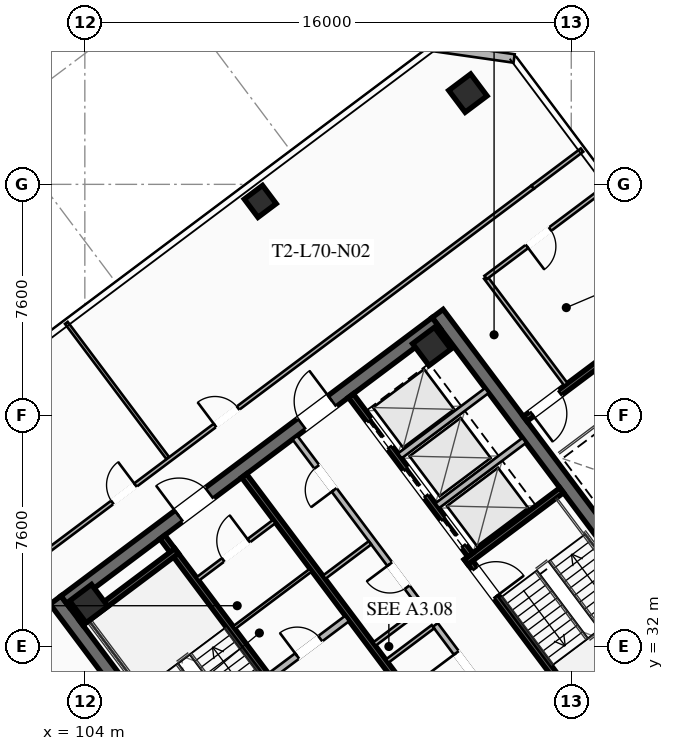
"""IFC4 building model, lengths in metres.
Left out: names, types, materials, properties, quantities, classifications, styles, units other than length and angle.
Written with IfcOpenShell. Run it as: python <this file> out.ifc"""

import sys

from ifc_helpers import new_model, si_unit, direction, frame, frame_2d, origin, origin_2d, place, context, subcontext, project, spatial, rectangle, hollow_rectangle, extrude, element, fill, save


model = new_model("IFC4")
c1 = context("Model", 3, precision=1e-05, world=origin(), true_north=direction((0.0, 1.0)))
c2 = subcontext(c1, "Body", "Model", "MODEL_VIEW")
j1 = project(units=[si_unit("LENGTHUNIT", "METRE"), si_unit("PLANEANGLEUNIT", "RADIAN")], contexts=[c1])
p1 = place(None, origin())
s1 = spatial("IfcSite", under=j1, at=p1, CompositionType="ELEMENT")
p2 = place(p1, origin())
s2 = spatial("IfcBuilding", under=s1, at=p2, CompositionType="ELEMENT")
p3 = place(p2, frame((0.0, 0.0, 259.4)))
s3 = spatial("IfcBuildingStorey", under=s2, at=p3, CompositionType="ELEMENT", Elevation=259.4)
for number, where, z_axis, x_axis in (
    (1, (112.396, 21.047, 0.0), (0.0, 0.0, 1.0), (-0.6, 0.8, 0.0)),
    (2, (115.604, 42.953, 0.0), (0.0, 0.0, 1.0), (0.6, -0.8, 0.0)),
):
    element("IfcWall", number, at=place(p3, frame(where, z_axis=z_axis, x_axis=x_axis)), inside=s3, PredefinedType="SHEAR", context=c2, shape_type="SweptSolid", body=[
        extrude(rectangle(XDim=15.6, YDim=0.45, at=frame_2d((7.8, 0.0))), origin(), (0.0, 0.0, 1.0), 4.0),
    ])
p4 = place(p3, frame((103.351, 33.482, 0.0), z_axis=(0.0, 0.0, 1.0), x_axis=(0.8, 0.6, 0.0)))
e3 = element("IfcWall", 3, at=p4, inside=s3, PredefinedType="SHEAR", context=c2, shape_type="SweptSolid", body=[
    extrude(rectangle(XDim=15.26, YDim=0.45, at=frame_2d((7.63, 0.0))), origin(), (0.0, 0.0, 1.0), 4.0),
])
p5 = place(p4, frame((4.68, 0.0, 0.0)))
e4 = element("IfcOpeningElement", 4, at=p5, cuts=e3, PredefinedType="OPENING", context=c2, shape_type="SweptSolid", body=[
    extrude(rectangle(XDim=1.25, YDim=2.25, at=frame_2d((0.625, 1.125))), frame((0.0, 0.235, 0.0), z_axis=(0.0, -1.0, 0.0), x_axis=(1.0, 0.0, 0.0)), (0.0, 0.0, 1.0), 0.47),
])
p6 = place(p4, frame((9.73, 0.0, 0.0)))
e5 = element("IfcOpeningElement", 5, at=p6, cuts=e3, PredefinedType="OPENING", context=c2, shape_type="SweptSolid", body=[
    extrude(rectangle(XDim=1.25, YDim=2.25, at=frame_2d((0.625, 1.125))), frame((0.0, 0.235, 0.0), z_axis=(0.0, -1.0, 0.0), x_axis=(1.0, 0.0, 0.0)), (0.0, 0.0, 1.0), 0.47),
])
for number, where, z_axis, x_axis in (
    (6, (115.41, 41.87, 0.0), (0.0, 0.0, 1.0), (0.8, 0.6, 0.0)),
    (7, (104.13, 33.41, 0.0), (0.0, 0.0, 1.0), (0.8, 0.6, 0.0)),
    (8, (116.6, 50.2, 0.0), (0.0, 0.0, 1.0), (0.8, 0.6, 0.0)),
):
    element("IfcColumn", number, at=place(p3, frame(where, z_axis=z_axis, x_axis=x_axis)), inside=s3, PredefinedType="COLUMN", context=c2, shape_type="SweptSolid", body=[
        extrude(hollow_rectangle(XDim=0.9, YDim=0.9, WallThickness=0.04, at=origin_2d()), origin(), (0.0, 0.0, 1.0), 3.7),
    ])
p7 = place(p3, frame((109.77, 46.64, 0.0), z_axis=(0.0, 0.0, 1.0), x_axis=(0.799999996291, 0.600000004945, 0.0)))
e9 = element("IfcColumn", 9, at=p7, inside=s3, PredefinedType="COLUMN", context=c2, shape_type="SweptSolid", body=[
    extrude(hollow_rectangle(XDim=0.75, YDim=0.75, WallThickness=0.032, at=origin_2d()), origin(), (0.0, 0.0, 1.0), 3.7),
])
p8 = place(p3, frame((115.46, 51.72, 0.0), z_axis=(0.0, 0.0, 1.0), x_axis=(0.989956760759, -0.141370477216, 0.0)))
e10 = element("IfcWall", 10, at=p8, inside=s3, PredefinedType="SOLIDWALL", context=c2, shape_type="SweptSolid", body=[
    extrude(rectangle(XDim=2.687, YDim=0.28, at=frame_2d((1.344, 0.0))), origin(), (0.0, 0.0, 1.0), 3.7),
])
p9 = place(p3, frame((111.44, 29.08, 0.0), z_axis=(0.0, 0.0, 1.0), x_axis=(-0.59999041401, 0.800007189403, 0.0)))
e11 = element("IfcWall", 11, at=p9, inside=s3, PredefinedType="SHEAR", context=c2, shape_type="SweptSolid", body=[
    extrude(rectangle(XDim=8.15, YDim=0.2, at=frame_2d((4.075, 0.0))), origin(), (0.0, 0.0, 1.0), 3.7),
])
p10 = place(p9, frame((0.45, 0.0, 0.0)))
e12 = element("IfcOpeningElement", 12, at=p10, cuts=e11, PredefinedType="OPENING", context=c2, shape_type="SweptSolid", body=[
    extrude(rectangle(XDim=1.15, YDim=2.2, at=frame_2d((0.575, 1.1))), frame((0.0, 0.11, 0.0), z_axis=(0.0, -1.0, 0.0), x_axis=(1.0, 0.0, 0.0)), (0.0, 0.0, 1.0), 0.22),
])
p11 = place(p3, frame((103.876, 32.782, 0.0), z_axis=(0.0, 0.0, 1.0), x_axis=(0.800014909178, 0.599980120581, 0.0)))
e13 = element("IfcWall", 13, at=p11, inside=s3, PredefinedType="SHEAR", context=c2, shape_type="SweptSolid", body=[
    extrude(rectangle(XDim=3.93, YDim=0.2, at=frame_2d((1.965, 0.0))), origin(), (0.0, 0.0, 1.0), 3.7),
])
p12 = place(p3, frame((116.56, 34.92, 0.0), z_axis=(0.0, 0.0, 1.0), x_axis=(0.59999041401, -0.800007189403, 0.0)))
e14 = element("IfcWall", 14, at=p12, inside=s3, PredefinedType="SHEAR", context=c2, shape_type="SweptSolid", body=[
    extrude(rectangle(XDim=8.15, YDim=0.2, at=frame_2d((4.075, 0.0))), origin(), (0.0, 0.0, 1.0), 3.7),
])
p13 = place(p12, frame((0.45, 0.0, 0.0)))
e15 = element("IfcOpeningElement", 15, at=p13, cuts=e14, PredefinedType="OPENING", context=c2, shape_type="SweptSolid", body=[
    extrude(rectangle(XDim=1.15, YDim=2.2, at=frame_2d((0.575, 1.1))), frame((0.0, 0.11, 0.0), z_axis=(0.0, -1.0, 0.0), x_axis=(1.0, 0.0, 0.0)), (0.0, 0.0, 1.0), 0.22),
])
p14 = place(p3, frame((116.54, 34.78, 0.0), z_axis=(0.0, 0.0, 1.0), x_axis=(0.800014909178, 0.599980120581, 0.0)))
e16 = element("IfcWall", 16, at=p14, inside=s3, PredefinedType="SHEAR", context=c2, shape_type="SweptSolid", body=[
    extrude(rectangle(XDim=3.93, YDim=0.2, at=frame_2d((1.965, 0.0))), origin(), (0.0, 0.0, 1.0), 3.7),
])
p15 = place(p3, frame((118.058, 25.856, 0.0), z_axis=(0.0, 0.0, 1.0), x_axis=(-0.600002657301, 0.799998007018, 0.0)))
e17 = element("IfcWall", 17, at=p15, inside=s3, PredefinedType="SHEAR", context=c2, shape_type="SweptSolid", body=[
    extrude(rectangle(XDim=14.7, YDim=0.2, at=frame_2d((7.35, 0.0))), origin(), (0.0, 0.0, 1.0), 3.7),
])
p16 = place(p3, frame((110.104, 31.028, 0.0), z_axis=(0.0, 0.0, 1.0), x_axis=(0.800018601094, 0.59997519774, 0.0)))
e18 = element("IfcWall", 18, at=p16, inside=s3, PredefinedType="SOLIDWALL", context=c2, shape_type="SweptSolid", body=[
    extrude(rectangle(XDim=3.15, YDim=0.22, at=frame_2d((1.575, 0.0))), origin(), (0.0, 0.0, 1.0), 2.659),
])
p17 = place(p16, frame((1.1, 0.0, 0.0)))
e19 = element("IfcOpeningElement", 19, at=p17, cuts=e18, PredefinedType="OPENING", context=c2, shape_type="SweptSolid", body=[
    extrude(rectangle(XDim=0.95, YDim=2.05, at=frame_2d((0.475, 1.025))), frame((0.0, 0.12, 0.0), z_axis=(0.0, -1.0, 0.0), x_axis=(1.0, 0.0, 0.0)), (0.0, 0.0, 1.0), 0.24),
])
p18 = place(p3, frame((112.75, 40.25, 0.0), z_axis=(0.0, 0.0, 1.0), x_axis=(0.599994036198, -0.800004472816, 0.0)))
e20 = element("IfcWall", 20, at=p18, inside=s3, PredefinedType="SHEAR", context=c2, shape_type="SweptSolid", body=[
    extrude(rectangle(XDim=6.55, YDim=0.2, at=frame_2d((3.275, 0.0))), origin(), (0.0, 0.0, 1.0), 3.7),
])
p19 = place(p18, frame((5.075, 0.0, 0.0)))
e21 = element("IfcOpeningElement", 21, at=p19, cuts=e20, PredefinedType="OPENING", context=c2, shape_type="SweptSolid", body=[
    extrude(rectangle(XDim=1.1, YDim=2.2, at=frame_2d((0.55, 1.1))), frame((0.0, 0.11, 0.0), z_axis=(0.0, -1.0, 0.0), x_axis=(1.0, 0.0, 0.0)), (0.0, 0.0, 1.0), 0.22),
])
p20 = place(p18, frame((3.025, 0.0, 0.0)))
e22 = element("IfcOpeningElement", 22, at=p20, cuts=e20, PredefinedType="OPENING", context=c2, shape_type="SweptSolid", body=[
    extrude(rectangle(XDim=1.1, YDim=2.2, at=frame_2d((0.55, 1.1))), frame((0.0, 0.11, 0.0), z_axis=(0.0, -1.0, 0.0), x_axis=(1.0, 0.0, 0.0)), (0.0, 0.0, 1.0), 0.22),
])
p21 = place(p18, frame((1.025, 0.0, 0.0)))
e23 = element("IfcOpeningElement", 23, at=p21, cuts=e20, PredefinedType="OPENING", context=c2, shape_type="SweptSolid", body=[
    extrude(rectangle(XDim=1.1, YDim=2.2, at=frame_2d((0.55, 1.1))), frame((0.0, 0.11, 0.0), z_axis=(0.0, -1.0, 0.0), x_axis=(1.0, 0.0, 0.0)), (0.0, 0.0, 1.0), 0.22),
])
for number, where, z_axis, x_axis in (
    (24, (115.59, 36.63, 0.0), (0.0, 0.0, 1.0), (0.8, 0.6, 0.0)),
    (25, (114.36, 38.27, 0.0), (0.0, 0.0, 1.0), (0.8, 0.6, 0.0)),
):
    element("IfcWall", number, at=place(p3, frame(where, z_axis=z_axis, x_axis=x_axis)), inside=s3, PredefinedType="SOLIDWALL", context=c2, shape_type="SweptSolid", body=[
        extrude(rectangle(XDim=3.58, YDim=0.2, at=frame_2d((1.79, 0.0))), origin(), (0.0, 0.0, 1.0), 3.7),
    ])
p22 = place(p3, frame((107.71, 34.22, 0.0), z_axis=(0.0, 0.0, 1.0), x_axis=(0.799981399002, 0.60002480053, 0.0)))
e26 = element("IfcWall", 26, at=p22, inside=s3, PredefinedType="PARTITIONING", context=c2, shape_type="SweptSolid", body=[
    extrude(rectangle(XDim=3.15, YDim=0.135, at=frame_2d((1.575, 0.0))), origin(), (0.0, 0.0, 1.0), 2.659),
])
p23 = place(p22, frame((1.05, 0.0, 0.0)))
e27 = element("IfcOpeningElement", 27, at=p23, cuts=e26, PredefinedType="OPENING", context=c2, shape_type="SweptSolid", body=[
    extrude(rectangle(XDim=1.05, YDim=2.2, at=frame_2d((0.525, 1.1))), frame((0.0, 0.077, 0.0), z_axis=(0.0, -1.0, 0.0), x_axis=(1.0, 0.0, 0.0)), (0.0, 0.0, 1.0), 0.155),
])
p24 = place(p3, frame((108.91, 32.62, 0.0), z_axis=(0.0, 0.0, 1.0), x_axis=(0.800018601094, 0.59997519774, 0.0)))
e28 = element("IfcWall", 28, at=p24, inside=s3, PredefinedType="PARTITIONING", context=c2, shape_type="SweptSolid", body=[
    extrude(rectangle(XDim=3.15, YDim=0.11, at=frame_2d((1.575, 0.0))), origin(), (0.0, 0.0, 1.0), 2.659),
])
p25 = place(p3, frame((119.73, 27.11, 0.0), z_axis=(0.0, 0.0, 1.0), x_axis=(-0.600005580459, 0.799995814625, 0.0)))
e29 = element("IfcWall", 29, at=p25, inside=s3, PredefinedType="SOLIDWALL", context=c2, shape_type="SweptSolid", body=[
    extrude(rectangle(XDim=7.0, YDim=0.2, at=frame_2d((3.5, 0.0))), origin(), (0.0, 0.0, 1.0), 2.659),
])
p26 = place(p25, frame((0.85, 0.0, 0.0)))
e30 = element("IfcOpeningElement", 30, at=p26, cuts=e29, PredefinedType="OPENING", context=c2, shape_type="SweptSolid", body=[
    extrude(rectangle(XDim=0.95, YDim=2.05, at=frame_2d((0.475, 1.025))), frame((0.0, 0.11, 0.0), z_axis=(0.0, -1.0, 0.0), x_axis=(1.0, 0.0, 0.0)), (0.0, 0.0, 1.0), 0.22),
])
p27 = place(p25, frame((4.8, 0.0, 0.0)))
e31 = element("IfcOpeningElement", 31, at=p27, cuts=e29, PredefinedType="OPENING", context=c2, shape_type="SweptSolid", body=[
    extrude(rectangle(XDim=1.05, YDim=2.2, at=frame_2d((0.525, 1.1))), frame((0.0, 0.11, 0.0), z_axis=(0.0, -1.0, 0.0), x_axis=(1.0, 0.0, 0.0)), (0.0, 0.0, 1.0), 0.22),
])
p28 = place(p3, frame((113.946, 31.522, 0.0), z_axis=(0.0, 0.0, 1.0), x_axis=(0.8, 0.6, 0.0)))
e32 = element("IfcWall", 32, at=p28, inside=s3, PredefinedType="PARTITIONING", context=c2, shape_type="SweptSolid", body=[
    extrude(rectangle(XDim=1.88, YDim=0.135, at=frame_2d((0.94, 0.0))), origin(), (0.0, 0.0, 1.0), 2.659),
])
p29 = place(p3, frame((115.11, 33.27, 0.0), z_axis=(0.0, 0.0, 1.0), x_axis=(-0.600011160345, 0.79999162962, 0.0)))
e33 = element("IfcWall", 33, at=p29, inside=s3, PredefinedType="SOLIDWALL", context=c2, shape_type="SweptSolid", body=[
    extrude(rectangle(XDim=7.0, YDim=0.2, at=frame_2d((3.5, 0.0))), origin(), (0.0, 0.0, 1.0), 2.659),
])
p30 = place(p29, frame((0.85, 0.0, 0.0)))
e34 = element("IfcOpeningElement", 34, at=p30, cuts=e33, PredefinedType="OPENING", context=c2, shape_type="SweptSolid", body=[
    extrude(rectangle(XDim=0.95, YDim=2.05, at=frame_2d((0.475, 1.025))), frame((0.0, 0.11, 0.0), z_axis=(0.0, -1.0, 0.0), x_axis=(1.0, 0.0, 0.0)), (0.0, 0.0, 1.0), 0.22),
])
p31 = place(p29, frame((4.85, 0.0, 0.0)))
e35 = element("IfcOpeningElement", 35, at=p31, cuts=e33, PredefinedType="OPENING", context=c2, shape_type="SweptSolid", body=[
    extrude(rectangle(XDim=0.95, YDim=2.05, at=frame_2d((0.475, 1.025))), frame((0.0, 0.11, 0.0), z_axis=(0.0, -1.0, 0.0), x_axis=(1.0, 0.0, 0.0)), (0.0, 0.0, 1.0), 0.22),
])
p32 = place(p3, frame((113.526, 32.082, 0.0), z_axis=(0.0, 0.0, 1.0), x_axis=(0.800046745961, 0.599937666993, 0.0)))
e36 = element("IfcWall", 36, at=p32, inside=s3, PredefinedType="PARTITIONING", context=c2, shape_type="SweptSolid", body=[
    extrude(rectangle(XDim=1.88, YDim=0.135, at=frame_2d((0.94, 0.0))), origin(), (0.0, 0.0, 1.0), 2.659),
])
p33 = place(p3, frame((111.876, 34.282, 0.0), z_axis=(0.0, 0.0, 1.0), x_axis=(0.8, 0.6, 0.0)))
e37 = element("IfcWall", 37, at=p33, inside=s3, PredefinedType="PARTITIONING", context=c2, shape_type="SweptSolid", body=[
    extrude(rectangle(XDim=1.88, YDim=0.135, at=frame_2d((0.94, 0.0))), origin(), (0.0, 0.0, 1.0), 2.659),
])
p34 = place(p3, frame((121.204, 41.528, 0.0), z_axis=(0.0, 0.0, 1.0), x_axis=(-0.800017232136, -0.599977023131, 0.0)))
e38 = element("IfcWall", 38, at=p34, inside=s3, PredefinedType="SHEAR", context=c2, shape_type="SweptSolid", body=[
    extrude(rectangle(XDim=3.4, YDim=0.2, at=frame_2d((1.7, 0.0))), origin(), (0.0, 0.0, 1.0), 3.7),
])
p35 = place(p34, frame((1.975, 0.0, 0.0)))
e39 = element("IfcOpeningElement", 39, at=p35, cuts=e38, PredefinedType="OPENING", context=c2, shape_type="SweptSolid", body=[
    extrude(rectangle(XDim=1.15, YDim=2.2, at=frame_2d((0.575, 1.1))), frame((0.0, 0.11, 0.0), z_axis=(0.0, -1.0, 0.0), x_axis=(1.0, 0.0, 0.0)), (0.0, 0.0, 1.0), 0.22),
])
p36 = place(p3, frame((119.824, 40.618, 0.0), z_axis=(0.0, 0.0, 1.0), x_axis=(-0.599982243973, 0.800013316712, 0.0)))
e40 = element("IfcWall", 40, at=p36, inside=s3, PredefinedType="PARTITIONING", context=c2, shape_type="SweptSolid", body=[
    extrude(rectangle(XDim=4.4, YDim=0.135, at=frame_2d((2.2, 0.0))), origin(), (0.0, 0.0, 1.0), 2.659),
])
p37 = place(p3, frame((99.65, 32.8, 0.0), z_axis=(0.0, 0.0, 1.0), x_axis=(0.8, 0.6, 0.0)))
e41 = element("IfcWall", 41, at=p37, inside=s3, PredefinedType="PARTITIONING", context=c2, shape_type="SweptSolid", body=[
    extrude(rectangle(XDim=23.85, YDim=0.135, at=frame_2d((11.925, 0.0))), origin(), (0.0, 0.0, 1.0), 2.659),
])
p38 = place(p37, frame((6.567, 0.0, 0.0)))
e42 = element("IfcOpeningElement", 42, at=p38, cuts=e41, PredefinedType="OPENING", context=c2, shape_type="SweptSolid", body=[
    extrude(rectangle(XDim=0.95, YDim=2.05, at=frame_2d((0.475, 1.025))), frame((0.0, 0.077, 0.0), z_axis=(0.0, -1.0, 0.0), x_axis=(1.0, 0.0, 0.0)), (0.0, 0.0, 1.0), 0.155),
])
p39 = place(p37, frame((10.788, 0.0, 0.0)))
e43 = element("IfcOpeningElement", 43, at=p39, cuts=e41, PredefinedType="OPENING", context=c2, shape_type="SweptSolid", body=[
    extrude(rectangle(XDim=0.95, YDim=2.05, at=frame_2d((0.475, 1.025))), frame((0.0, 0.077, 0.0), z_axis=(0.0, -1.0, 0.0), x_axis=(1.0, 0.0, 0.0)), (0.0, 0.0, 1.0), 0.155),
])
p40 = place(p3, frame((118.73, 47.11, 0.0), z_axis=(0.0, 0.0, 1.0), x_axis=(0.800057727462, 0.599923022336, 0.0)))
e44 = element("IfcWall", 44, at=p40, inside=s3, PredefinedType="PARTITIONING", context=c2, shape_type="SweptSolid", body=[
    extrude(rectangle(XDim=2.03, YDim=0.135, at=frame_2d((1.015, 0.0))), origin(), (0.0, 0.0, 1.0), 2.659),
])
p41 = place(p3, frame((106.722, 38.204, 0.0), z_axis=(0.0, 0.0, 1.0), x_axis=(-0.599985922959, 0.800010557587, 0.0)))
e45 = element("IfcWall", 45, at=p41, inside=s3, PredefinedType="PARTITIONING", context=c2, shape_type="SweptSolid", body=[
    extrude(rectangle(XDim=5.55, YDim=0.11, at=frame_2d((2.775, 0.0))), origin(), (0.0, 0.0, 1.0), 2.659),
])
p42 = place(p3, frame((121.224, 47.168, 0.0), z_axis=(0.0, 0.0, 1.0), x_axis=(-0.8, -0.6, 0.0)))
e46 = element("IfcWall", 46, at=p42, inside=s3, PredefinedType="PARTITIONING", context=c2, shape_type="SweptSolid", body=[
    extrude(rectangle(XDim=5.05, YDim=0.135, at=frame_2d((2.525, 0.0))), origin(), (0.0, 0.0, 1.0), 2.659),
])
p43 = place(p42, frame((2.4, 0.0, 0.0)))
e47 = element("IfcOpeningElement", 47, at=p43, cuts=e46, PredefinedType="OPENING", context=c2, shape_type="SweptSolid", body=[
    extrude(rectangle(XDim=0.95, YDim=2.05, at=frame_2d((0.475, 1.025))), frame((0.0, 0.077, 0.0), z_axis=(0.0, -1.0, 0.0), x_axis=(1.0, 0.0, 0.0)), (0.0, 0.0, 1.0), 0.155),
])
p44 = place(p3, frame((111.464, 17.048, 0.0), z_axis=(0.0, 0.0, 1.0), x_axis=(-0.600003983917, 0.799997012046, 0.0)))
e48 = element("IfcWall", 48, at=p44, inside=s3, PredefinedType="PARTITIONING", context=c2, shape_type="SweptSolid", body=[
    extrude(rectangle(XDim=19.61, YDim=0.135, at=frame_2d((9.805, 0.0))), origin(), (0.0, 0.0, 1.0), 2.659),
])
p45 = place(p44, frame((10.083, 0.0, 0.0)))
e49 = element("IfcOpeningElement", 49, at=p45, cuts=e48, PredefinedType="OPENING", context=c2, shape_type="SweptSolid", body=[
    extrude(rectangle(XDim=0.95, YDim=2.05, at=frame_2d((0.475, 1.025))), frame((0.0, 0.077, 0.0), z_axis=(0.0, -1.0, 0.0), x_axis=(1.0, 0.0, 0.0)), (0.0, 0.0, 1.0), 0.155),
])
p46 = place(p5, origin())
e50 = element("IfcDoor", 50, at=p46, inside=s3, OperationType="SINGLE_SWING_LEFT", PredefinedType="DOOR", context=c2, shape_type="SweptSolid", body=[
    extrude(rectangle(XDim=1.25, YDim=2.25, at=frame_2d((0.625, 1.125))), frame((0.0, 0.025, 0.0), z_axis=(0.0, -1.0, 0.0), x_axis=(1.0, 0.0, 0.0)), (0.0, 0.0, 1.0), 0.05),
])
fill(e4, e50)
p47 = place(p6, origin())
e51 = element("IfcDoor", 51, at=p47, inside=s3, OperationType="SINGLE_SWING_RIGHT", PredefinedType="DOOR", context=c2, shape_type="SweptSolid", body=[
    extrude(rectangle(XDim=1.25, YDim=2.25, at=frame_2d((0.625, 1.125))), frame((0.0, 0.025, 0.0), z_axis=(0.0, -1.0, 0.0), x_axis=(1.0, 0.0, 0.0)), (0.0, 0.0, 1.0), 0.05),
])
fill(e5, e51)
p48 = place(p13, origin())
e52 = element("IfcDoor", 52, at=p48, inside=s3, OperationType="SINGLE_SWING_RIGHT", PredefinedType="DOOR", context=c2, shape_type="SweptSolid", body=[
    extrude(rectangle(XDim=1.15, YDim=2.2, at=frame_2d((0.575, 1.1))), frame((0.0, 0.025, 0.0), z_axis=(0.0, -1.0, 0.0), x_axis=(1.0, 0.0, 0.0)), (0.0, 0.0, 1.0), 0.05),
])
fill(e15, e52)
p49 = place(p23, origin())
e53 = element("IfcDoor", 53, at=p49, inside=s3, OperationType="SINGLE_SWING_RIGHT", PredefinedType="DOOR", context=c2, shape_type="SweptSolid", body=[
    extrude(rectangle(XDim=1.05, YDim=2.2, at=frame_2d((0.525, 1.1))), frame((0.0, 0.025, 0.0), z_axis=(0.0, -1.0, 0.0), x_axis=(1.0, 0.0, 0.0)), (0.0, 0.0, 1.0), 0.05),
])
fill(e27, e53)
p50 = place(p17, origin())
e54 = element("IfcDoor", 54, at=p50, inside=s3, OperationType="SINGLE_SWING_LEFT", PredefinedType="DOOR", context=c2, shape_type="SweptSolid", body=[
    extrude(rectangle(XDim=0.95, YDim=2.05, at=frame_2d((0.475, 1.025))), frame((0.0, 0.025, 0.0), z_axis=(0.0, -1.0, 0.0), x_axis=(1.0, 0.0, 0.0)), (0.0, 0.0, 1.0), 0.05),
])
fill(e19, e54)
p51 = place(p27, origin())
e55 = element("IfcDoor", 55, at=p51, inside=s3, OperationType="SINGLE_SWING_RIGHT", PredefinedType="DOOR", context=c2, shape_type="SweptSolid", body=[
    extrude(rectangle(XDim=1.05, YDim=2.2, at=frame_2d((0.525, 1.1))), frame((0.0, 0.025, 0.0), z_axis=(0.0, -1.0, 0.0), x_axis=(1.0, 0.0, 0.0)), (0.0, 0.0, 1.0), 0.05),
])
fill(e31, e55)
p52 = place(p30, origin())
e56 = element("IfcDoor", 56, at=p52, inside=s3, OperationType="SINGLE_SWING_RIGHT", PredefinedType="DOOR", context=c2, shape_type="SweptSolid", body=[
    extrude(rectangle(XDim=0.95, YDim=2.05, at=frame_2d((0.475, 1.025))), frame((0.0, 0.025, 0.0), z_axis=(0.0, -1.0, 0.0), x_axis=(1.0, 0.0, 0.0)), (0.0, 0.0, 1.0), 0.05),
])
fill(e34, e56)
p53 = place(p31, origin())
e57 = element("IfcDoor", 57, at=p53, inside=s3, OperationType="SINGLE_SWING_LEFT", PredefinedType="DOOR", context=c2, shape_type="SweptSolid", body=[
    extrude(rectangle(XDim=0.95, YDim=2.05, at=frame_2d((0.475, 1.025))), frame((0.0, 0.025, 0.0), z_axis=(0.0, -1.0, 0.0), x_axis=(1.0, 0.0, 0.0)), (0.0, 0.0, 1.0), 0.05),
])
fill(e35, e57)
p54 = place(p35, origin())
e58 = element("IfcDoor", 58, at=p54, inside=s3, OperationType="SINGLE_SWING_RIGHT", PredefinedType="DOOR", context=c2, shape_type="SweptSolid", body=[
    extrude(rectangle(XDim=1.15, YDim=2.2, at=frame_2d((0.575, 1.1))), frame((0.0, 0.025, 0.0), z_axis=(0.0, -1.0, 0.0), x_axis=(1.0, 0.0, 0.0)), (0.0, 0.0, 1.0), 0.05),
])
fill(e39, e58)
p55 = place(p38, origin())
e59 = element("IfcDoor", 59, at=p55, inside=s3, OperationType="SINGLE_SWING_RIGHT", PredefinedType="DOOR", context=c2, shape_type="SweptSolid", body=[
    extrude(rectangle(XDim=0.95, YDim=2.05, at=frame_2d((0.475, 1.025))), frame((0.0, 0.025, 0.0), z_axis=(0.0, -1.0, 0.0), x_axis=(1.0, 0.0, 0.0)), (0.0, 0.0, 1.0), 0.05),
])
fill(e42, e59)
p56 = place(p39, origin())
e60 = element("IfcDoor", 60, at=p56, inside=s3, OperationType="SINGLE_SWING_LEFT", PredefinedType="DOOR", context=c2, shape_type="SweptSolid", body=[
    extrude(rectangle(XDim=0.95, YDim=2.05, at=frame_2d((0.475, 1.025))), frame((0.0, 0.025, 0.0), z_axis=(0.0, -1.0, 0.0), x_axis=(1.0, 0.0, 0.0)), (0.0, 0.0, 1.0), 0.05),
])
fill(e43, e60)
p57 = place(p43, origin())
e61 = element("IfcDoor", 61, at=p57, inside=s3, OperationType="SINGLE_SWING_RIGHT", PredefinedType="DOOR", context=c2, shape_type="SweptSolid", body=[
    extrude(rectangle(XDim=0.95, YDim=2.05, at=frame_2d((0.475, 1.025))), frame((0.0, 0.025, 0.0), z_axis=(0.0, -1.0, 0.0), x_axis=(1.0, 0.0, 0.0)), (0.0, 0.0, 1.0), 0.05),
])
fill(e47, e61)
p58 = place(p19, origin())
e62 = element("IfcDoor", 62, at=p58, inside=s3, OperationType="SLIDING_TO_LEFT", PredefinedType="DOOR", context=c2, shape_type="SweptSolid", body=[
    extrude(rectangle(XDim=1.1, YDim=2.2, at=frame_2d((0.55, 1.1))), frame((0.0, 0.025, 0.0), z_axis=(0.0, -1.0, 0.0), x_axis=(1.0, 0.0, 0.0)), (0.0, 0.0, 1.0), 0.05),
])
fill(e21, e62)
p59 = place(p20, origin())
e63 = element("IfcDoor", 63, at=p59, inside=s3, OperationType="SLIDING_TO_LEFT", PredefinedType="DOOR", context=c2, shape_type="SweptSolid", body=[
    extrude(rectangle(XDim=1.1, YDim=2.2, at=frame_2d((0.55, 1.1))), frame((0.0, 0.025, 0.0), z_axis=(0.0, -1.0, 0.0), x_axis=(1.0, 0.0, 0.0)), (0.0, 0.0, 1.0), 0.05),
])
fill(e22, e63)
p60 = place(p21, origin())
e64 = element("IfcDoor", 64, at=p60, inside=s3, OperationType="SLIDING_TO_LEFT", PredefinedType="DOOR", context=c2, shape_type="SweptSolid", body=[
    extrude(rectangle(XDim=1.1, YDim=2.2, at=frame_2d((0.55, 1.1))), frame((0.0, 0.025, 0.0), z_axis=(0.0, -1.0, 0.0), x_axis=(1.0, 0.0, 0.0)), (0.0, 0.0, 1.0), 0.05),
])
fill(e23, e64)
save(model, sys.argv[1])
